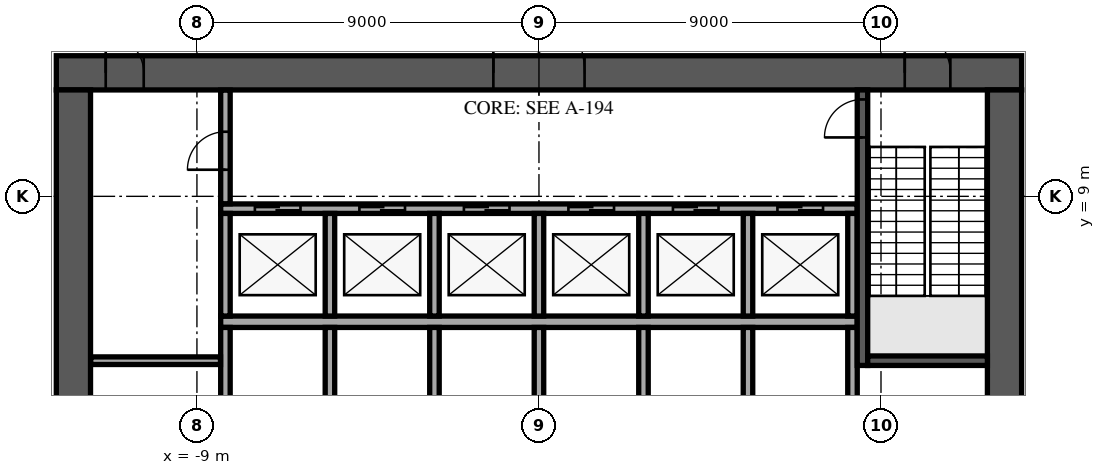
"""IFC4 building model, lengths in metres.
Left out: names, types, materials, properties, quantities, classifications, styles, units other than length and angle.
Written with IfcOpenShell. Run it as: python <this file> out.ifc"""

import sys

from ifc_helpers import new_model, si_unit, direction, frame, frame_2d, origin, place, context, subcontext, project, spatial, rectangle, extrude, element, fill, save


model = new_model("IFC4")
c1 = context("Model", 3, precision=1e-05, world=origin(), true_north=direction((0.0, 1.0)))
c2 = subcontext(c1, "Body", "Model", "MODEL_VIEW")
j1 = project(units=[si_unit("LENGTHUNIT", "METRE"), si_unit("PLANEANGLEUNIT", "RADIAN")], contexts=[c1])
p1 = place(None, origin())
s1 = spatial("IfcSite", under=j1, at=p1, CompositionType="ELEMENT")
p2 = place(p1, origin())
s2 = spatial("IfcBuilding", under=s1, at=p2, CompositionType="ELEMENT")
p3 = place(p2, frame((0.0, 0.0, 237.3)))
s3 = spatial("IfcBuildingStorey", under=s2, at=p3, CompositionType="ELEMENT", Elevation=237.3)
p4 = place(p3, frame((-12.7, 12.25, 0.0), z_axis=(0.0, 0.0, 1.0), x_axis=(1.0, 0.0, 0.0)))
e1 = element("IfcWall", 1, at=p4, inside=s3, PredefinedType="SHEAR", context=c2, shape_type="SweptSolid", body=[
    extrude(rectangle(XDim=25.4, YDim=0.9, at=frame_2d((12.7, 0.0))), origin(), (0.0, 0.0, 1.0), 5.24),
])
p5 = place(p4, frame((11.5, 0.0, 0.0)))
e2 = element("IfcOpeningElement", 2, at=p5, cuts=e1, PredefinedType="OPENING", context=c2, shape_type="SweptSolid", body=[
    extrude(rectangle(XDim=2.4, YDim=2.4, at=frame_2d((1.2, 1.2))), frame((0.0, 0.46, 0.0), z_axis=(0.0, -1.0, 0.0), x_axis=(1.0, 0.0, 0.0)), (0.0, 0.0, 1.0), 0.92),
])
p6 = place(p4, frame((22.325, 0.0, 0.0)))
e3 = element("IfcOpeningElement", 3, at=p6, cuts=e1, PredefinedType="OPENING", context=c2, shape_type="SweptSolid", body=[
    extrude(rectangle(XDim=1.2, YDim=2.1, at=frame_2d((0.6, 1.05))), frame((0.0, 0.46, 0.0), z_axis=(0.0, -1.0, 0.0), x_axis=(1.0, 0.0, 0.0)), (0.0, 0.0, 1.0), 0.92),
])
p7 = place(p4, frame((1.3, 0.0, 0.0)))
e4 = element("IfcOpeningElement", 4, at=p7, cuts=e1, PredefinedType="OPENING", context=c2, shape_type="SweptSolid", body=[
    extrude(rectangle(XDim=1.0, YDim=2.1, at=frame_2d((0.5, 1.05))), frame((0.0, 0.46, 0.0), z_axis=(0.0, -1.0, 0.0), x_axis=(1.0, 0.0, 0.0)), (0.0, 0.0, 1.0), 0.92),
])
p8 = place(p3, frame((12.25, -11.8, 0.0), z_axis=(0.0, 0.0, 1.0), x_axis=(0.0, 1.0, 0.0)))
e5 = element("IfcWall", 5, at=p8, inside=s3, PredefinedType="SHEAR", context=c2, shape_type="SweptSolid", body=[
    extrude(rectangle(XDim=23.6, YDim=0.9, at=frame_2d((11.8, 0.0))), origin(), (0.0, 0.0, 1.0), 5.24),
])
p9 = place(p8, frame((10.6, 0.0, 0.0)))
e6 = element("IfcOpeningElement", 6, at=p9, cuts=e5, PredefinedType="OPENING", context=c2, shape_type="SweptSolid", body=[
    extrude(rectangle(XDim=2.4, YDim=2.4, at=frame_2d((1.2, 1.2))), frame((0.0, 0.46, 0.0), z_axis=(0.0, -1.0, 0.0), x_axis=(1.0, 0.0, 0.0)), (0.0, 0.0, 1.0), 0.92),
])
p10 = place(p3, frame((-12.25, -11.8, 0.0), z_axis=(0.0, 0.0, 1.0), x_axis=(0.0, 1.0, 0.0)))
e7 = element("IfcWall", 7, at=p10, inside=s3, PredefinedType="SHEAR", context=c2, shape_type="SweptSolid", body=[
    extrude(rectangle(XDim=23.6, YDim=0.9, at=frame_2d((11.8, 0.0))), origin(), (0.0, 0.0, 1.0), 5.24),
])
p11 = place(p10, frame((10.6, 0.0, 0.0)))
e8 = element("IfcOpeningElement", 8, at=p11, cuts=e7, PredefinedType="OPENING", context=c2, shape_type="SweptSolid", body=[
    extrude(rectangle(XDim=2.4, YDim=2.4, at=frame_2d((1.2, 1.2))), frame((0.0, 0.46, 0.0), z_axis=(0.0, -1.0, 0.0), x_axis=(1.0, 0.0, 0.0)), (0.0, 0.0, 1.0), 0.92),
])
p12 = place(p3, frame((-8.375, 5.7, 0.0), z_axis=(0.0, 0.0, 1.0), x_axis=(1.0, 0.0, 0.0)))
e9 = element("IfcWall", 9, at=p12, inside=s3, PredefinedType="SOLIDWALL", context=c2, shape_type="SweptSolid", body=[
    extrude(rectangle(XDim=16.75, YDim=0.3, at=frame_2d((8.375, 0.0))), origin(), (0.0, 0.0, 1.0), 5.24),
])
for number, where, z_axis, x_axis in (
    (10, (-8.25, 2.85, 0.0), (0.0, 0.0, 1.0), (0.0, 1.0, 0.0)),
    (11, (-5.5, 2.85, 0.0), (0.0, 0.0, 1.0), (0.0, 1.0, 0.0)),
    (12, (-2.75, 2.85, 0.0), (0.0, 0.0, 1.0), (0.0, 1.0, 0.0)),
    (13, (0.0, 2.85, 0.0), (0.0, 0.0, 1.0), (0.0, 1.0, 0.0)),
    (14, (2.75, 2.85, 0.0), (0.0, 0.0, 1.0), (0.0, 1.0, 0.0)),
    (15, (5.5, 2.85, 0.0), (0.0, 0.0, 1.0), (0.0, 1.0, 0.0)),
    (16, (8.25, 2.85, 0.0), (0.0, 0.0, 1.0), (0.0, 1.0, 0.0)),
):
    element("IfcWall", number, at=place(p3, frame(where, z_axis=z_axis, x_axis=x_axis)), inside=s3, PredefinedType="SOLIDWALL", context=c2, shape_type="SweptSolid", body=[
        extrude(rectangle(XDim=2.7, YDim=0.25, at=frame_2d((1.35, 0.0))), origin(), (0.0, 0.0, 1.0), 5.24),
    ])
p13 = place(p3, frame((-8.375, 8.675, 0.0), z_axis=(0.0, 0.0, 1.0), x_axis=(1.0, 0.0, 0.0)))
e17 = element("IfcWall", 17, at=p13, inside=s3, PredefinedType="SOLIDWALL", context=c2, shape_type="SweptSolid", body=[
    extrude(rectangle(XDim=16.75, YDim=0.25, at=frame_2d((8.375, 0.0))), origin(), (0.0, 0.0, 1.0), 5.24),
])
p14 = place(p13, frame((0.9, 0.0, 0.0)))
e18 = element("IfcOpeningElement", 18, at=p14, cuts=e17, PredefinedType="OPENING", context=c2, shape_type="SweptSolid", body=[
    extrude(rectangle(XDim=1.2, YDim=2.1, at=frame_2d((0.6, 1.05))), frame((0.0, 0.135, 0.0), z_axis=(0.0, -1.0, 0.0), x_axis=(1.0, 0.0, 0.0)), (0.0, 0.0, 1.0), 0.27),
])
p15 = place(p13, frame((3.65, 0.0, 0.0)))
e19 = element("IfcOpeningElement", 19, at=p15, cuts=e17, PredefinedType="OPENING", context=c2, shape_type="SweptSolid", body=[
    extrude(rectangle(XDim=1.2, YDim=2.1, at=frame_2d((0.6, 1.05))), frame((0.0, 0.135, 0.0), z_axis=(0.0, -1.0, 0.0), x_axis=(1.0, 0.0, 0.0)), (0.0, 0.0, 1.0), 0.27),
])
p16 = place(p13, frame((6.4, 0.0, 0.0)))
e20 = element("IfcOpeningElement", 20, at=p16, cuts=e17, PredefinedType="OPENING", context=c2, shape_type="SweptSolid", body=[
    extrude(rectangle(XDim=1.2, YDim=2.1, at=frame_2d((0.6, 1.05))), frame((0.0, 0.135, 0.0), z_axis=(0.0, -1.0, 0.0), x_axis=(1.0, 0.0, 0.0)), (0.0, 0.0, 1.0), 0.27),
])
p17 = place(p13, frame((9.15, 0.0, 0.0)))
e21 = element("IfcOpeningElement", 21, at=p17, cuts=e17, PredefinedType="OPENING", context=c2, shape_type="SweptSolid", body=[
    extrude(rectangle(XDim=1.2, YDim=2.1, at=frame_2d((0.6, 1.05))), frame((0.0, 0.135, 0.0), z_axis=(0.0, -1.0, 0.0), x_axis=(1.0, 0.0, 0.0)), (0.0, 0.0, 1.0), 0.27),
])
p18 = place(p13, frame((11.9, 0.0, 0.0)))
e22 = element("IfcOpeningElement", 22, at=p18, cuts=e17, PredefinedType="OPENING", context=c2, shape_type="SweptSolid", body=[
    extrude(rectangle(XDim=1.2, YDim=2.1, at=frame_2d((0.6, 1.05))), frame((0.0, 0.135, 0.0), z_axis=(0.0, -1.0, 0.0), x_axis=(1.0, 0.0, 0.0)), (0.0, 0.0, 1.0), 0.27),
])
p19 = place(p13, frame((14.65, 0.0, 0.0)))
e23 = element("IfcOpeningElement", 23, at=p19, cuts=e17, PredefinedType="OPENING", context=c2, shape_type="SweptSolid", body=[
    extrude(rectangle(XDim=1.2, YDim=2.1, at=frame_2d((0.6, 1.05))), frame((0.0, 0.135, 0.0), z_axis=(0.0, -1.0, 0.0), x_axis=(1.0, 0.0, 0.0)), (0.0, 0.0, 1.0), 0.27),
])
for number, where, z_axis, x_axis in (
    (24, (-8.25, 5.85, 0.0), (0.0, 0.0, 1.0), (0.0, 1.0, 0.0)),
    (25, (-5.5, 5.85, 0.0), (0.0, 0.0, 1.0), (0.0, 1.0, 0.0)),
    (26, (-2.75, 5.85, 0.0), (0.0, 0.0, 1.0), (0.0, 1.0, 0.0)),
    (27, (0.0, 5.85, 0.0), (0.0, 0.0, 1.0), (0.0, 1.0, 0.0)),
    (28, (2.75, 5.85, 0.0), (0.0, 0.0, 1.0), (0.0, 1.0, 0.0)),
    (29, (5.5, 5.85, 0.0), (0.0, 0.0, 1.0), (0.0, 1.0, 0.0)),
    (30, (8.25, 5.85, 0.0), (0.0, 0.0, 1.0), (0.0, 1.0, 0.0)),
):
    element("IfcWall", number, at=place(p3, frame(where, z_axis=z_axis, x_axis=x_axis)), inside=s3, PredefinedType="SOLIDWALL", context=c2, shape_type="SweptSolid", body=[
        extrude(rectangle(XDim=2.7, YDim=0.25, at=frame_2d((1.35, 0.0))), origin(), (0.0, 0.0, 1.0), 5.24),
    ])
p20 = place(p3, frame((8.512, 4.55, 0.0), z_axis=(0.0, 0.0, 1.0), x_axis=(0.0, 1.0, 0.0)))
e31 = element("IfcWall", 31, at=p20, inside=s3, PredefinedType="SOLIDWALL", context=c2, shape_type="SweptSolid", body=[
    extrude(rectangle(XDim=7.25, YDim=0.275, at=frame_2d((3.625, 0.0))), origin(), (0.0, 0.0, 1.0), 5.24),
])
p21 = place(p20, frame((6.0, 0.0, 0.0)))
e32 = element("IfcOpeningElement", 32, at=p21, cuts=e31, PredefinedType="OPENING", context=c2, shape_type="SweptSolid", body=[
    extrude(rectangle(XDim=1.0, YDim=2.1, at=frame_2d((0.5, 1.05))), frame((0.0, 0.147, 0.0), z_axis=(0.0, -1.0, 0.0), x_axis=(1.0, 0.0, 0.0)), (0.0, 0.0, 1.0), 0.295),
])
p22 = place(p3, frame((8.65, 4.675, 0.0), z_axis=(0.0, 0.0, 1.0), x_axis=(1.0, 0.0, 0.0)))
e33 = element("IfcWall", 33, at=p22, inside=s3, PredefinedType="SOLIDWALL", context=c2, shape_type="SweptSolid", body=[
    extrude(rectangle(XDim=3.15, YDim=0.25, at=frame_2d((1.575, 0.0))), origin(), (0.0, 0.0, 1.0), 5.24),
])
p23 = place(p3, frame((-11.795, 4.675, 0.0), z_axis=(0.0, 0.0, 1.0), x_axis=(1.0, 0.0, 0.0)))
e34 = element("IfcWall", 34, at=p23, inside=s3, PredefinedType="PARTITIONING", context=c2, shape_type="SweptSolid", body=[
    extrude(rectangle(XDim=3.415, YDim=0.2, at=frame_2d((1.708, 0.0))), origin(), (0.0, 0.0, 1.0), 5.24),
])
p24 = place(p3, frame((-8.25, 8.805, 0.0), z_axis=(0.0, 0.0, 1.0), x_axis=(0.0, 1.0, 0.0)))
e35 = element("IfcWall", 35, at=p24, inside=s3, PredefinedType="PARTITIONING", context=c2, shape_type="SweptSolid", body=[
    extrude(rectangle(XDim=2.99, YDim=0.25, at=frame_2d((1.495, 0.0))), origin(), (0.0, 0.0, 1.0), 5.24),
])
p25 = place(p24, frame((0.895, 0.0, 0.0)))
e36 = element("IfcOpeningElement", 36, at=p25, cuts=e35, PredefinedType="OPENING", context=c2, shape_type="SweptSolid", body=[
    extrude(rectangle(XDim=1.0, YDim=2.1, at=frame_2d((0.5, 1.05))), frame((0.0, 0.135, 0.0), z_axis=(0.0, -1.0, 0.0), x_axis=(1.0, 0.0, 0.0)), (0.0, 0.0, 1.0), 0.27),
])
p26 = place(p3, frame((33.651, 11.398, 0.0), z_axis=(0.0, 0.0, 1.0), x_axis=(-0.788011466291, 0.61566056313, 0.0)))
e37 = element("IfcWall", 37, at=p26, inside=s3, PredefinedType="STANDARD", context=c2, shape_type="SweptSolid", body=[
    extrude(rectangle(XDim=39.0, YDim=0.6, at=frame_2d((19.5, 0.0))), origin(), (0.0, 0.0, 1.0), 5.24),
])
p27 = place(p26, frame((1.217, 0.0, 0.6)))
e38 = element("IfcOpeningElement", 38, at=p27, cuts=e37, PredefinedType="OPENING", context=c2, shape_type="SweptSolid", body=[
    extrude(rectangle(XDim=1.9, YDim=4.19, at=frame_2d((0.95, 2.095))), frame((0.0, 0.31, 0.0), z_axis=(0.0, -1.0, 0.0), x_axis=(1.0, 0.0, 0.0)), (0.0, 0.0, 1.0), 0.62),
])
p28 = place(p26, frame((5.55, 0.0, 0.6)))
e39 = element("IfcOpeningElement", 39, at=p28, cuts=e37, PredefinedType="OPENING", context=c2, shape_type="SweptSolid", body=[
    extrude(rectangle(XDim=1.9, YDim=4.19, at=frame_2d((0.95, 2.095))), frame((0.0, 0.31, 0.0), z_axis=(0.0, -1.0, 0.0), x_axis=(1.0, 0.0, 0.0)), (0.0, 0.0, 1.0), 0.62),
])
p29 = place(p26, frame((18.55, 0.0, 0.6)))
e40 = element("IfcOpeningElement", 40, at=p29, cuts=e37, PredefinedType="OPENING", context=c2, shape_type="SweptSolid", body=[
    extrude(rectangle(XDim=1.9, YDim=4.19, at=frame_2d((0.95, 2.095))), frame((0.0, 0.31, 0.0), z_axis=(0.0, -1.0, 0.0), x_axis=(1.0, 0.0, 0.0)), (0.0, 0.0, 1.0), 0.62),
])
p30 = place(p26, frame((22.883, 0.0, 0.6)))
e41 = element("IfcOpeningElement", 41, at=p30, cuts=e37, PredefinedType="OPENING", context=c2, shape_type="SweptSolid", body=[
    extrude(rectangle(XDim=1.9, YDim=4.19, at=frame_2d((0.95, 2.095))), frame((0.0, 0.31, 0.0), z_axis=(0.0, -1.0, 0.0), x_axis=(1.0, 0.0, 0.0)), (0.0, 0.0, 1.0), 0.62),
])
p31 = place(p26, frame((31.55, 0.0, 0.6)))
e42 = element("IfcOpeningElement", 42, at=p31, cuts=e37, PredefinedType="OPENING", context=c2, shape_type="SweptSolid", body=[
    extrude(rectangle(XDim=1.9, YDim=4.19, at=frame_2d((0.95, 2.095))), frame((0.0, 0.31, 0.0), z_axis=(0.0, -1.0, 0.0), x_axis=(1.0, 0.0, 0.0)), (0.0, 0.0, 1.0), 0.62),
])
p32 = place(p26, frame((35.883, 0.0, 0.6)))
e43 = element("IfcOpeningElement", 43, at=p32, cuts=e37, PredefinedType="OPENING", context=c2, shape_type="SweptSolid", body=[
    extrude(rectangle(XDim=1.9, YDim=4.19, at=frame_2d((0.95, 2.095))), frame((0.0, 0.31, 0.0), z_axis=(0.0, -1.0, 0.0), x_axis=(1.0, 0.0, 0.0)), (0.0, 0.0, 1.0), 0.62),
])
p33 = place(p5, origin())
e44 = element("IfcDoor", 44, at=p33, inside=s3, OperationType="SINGLE_SWING_LEFT", PredefinedType="DOOR", context=c2, shape_type="SweptSolid", body=[
    extrude(rectangle(XDim=2.4, YDim=2.4, at=frame_2d((1.2, 1.2))), frame((0.0, 0.025, 0.0), z_axis=(0.0, -1.0, 0.0), x_axis=(1.0, 0.0, 0.0)), (0.0, 0.0, 1.0), 0.05),
])
fill(e2, e44)
p34 = place(p6, origin())
e45 = element("IfcDoor", 45, at=p34, inside=s3, OperationType="SINGLE_SWING_LEFT", PredefinedType="DOOR", context=c2, shape_type="SweptSolid", body=[
    extrude(rectangle(XDim=1.2, YDim=2.1, at=frame_2d((0.6, 1.05))), frame((0.0, 0.025, 0.0), z_axis=(0.0, -1.0, 0.0), x_axis=(1.0, 0.0, 0.0)), (0.0, 0.0, 1.0), 0.05),
])
fill(e3, e45)
p35 = place(p7, origin())
e46 = element("IfcDoor", 46, at=p35, inside=s3, OperationType="SINGLE_SWING_LEFT", PredefinedType="DOOR", context=c2, shape_type="SweptSolid", body=[
    extrude(rectangle(XDim=1.0, YDim=2.1, at=frame_2d((0.5, 1.05))), frame((0.0, 0.025, 0.0), z_axis=(0.0, -1.0, 0.0), x_axis=(1.0, 0.0, 0.0)), (0.0, 0.0, 1.0), 0.05),
])
fill(e4, e46)
p36 = place(p14, origin())
e47 = element("IfcDoor", 47, at=p36, inside=s3, OperationType="DOUBLE_DOOR_SLIDING", PredefinedType="DOOR", context=c2, shape_type="SweptSolid", body=[
    extrude(rectangle(XDim=1.2, YDim=2.1, at=frame_2d((0.6, 1.05))), frame((0.0, 0.025, 0.0), z_axis=(0.0, -1.0, 0.0), x_axis=(1.0, 0.0, 0.0)), (0.0, 0.0, 1.0), 0.05),
])
fill(e18, e47)
p37 = place(p15, origin())
e48 = element("IfcDoor", 48, at=p37, inside=s3, OperationType="DOUBLE_DOOR_SLIDING", PredefinedType="DOOR", context=c2, shape_type="SweptSolid", body=[
    extrude(rectangle(XDim=1.2, YDim=2.1, at=frame_2d((0.6, 1.05))), frame((0.0, 0.025, 0.0), z_axis=(0.0, -1.0, 0.0), x_axis=(1.0, 0.0, 0.0)), (0.0, 0.0, 1.0), 0.05),
])
fill(e19, e48)
p38 = place(p16, origin())
e49 = element("IfcDoor", 49, at=p38, inside=s3, OperationType="DOUBLE_DOOR_SLIDING", PredefinedType="DOOR", context=c2, shape_type="SweptSolid", body=[
    extrude(rectangle(XDim=1.2, YDim=2.1, at=frame_2d((0.6, 1.05))), frame((0.0, 0.025, 0.0), z_axis=(0.0, -1.0, 0.0), x_axis=(1.0, 0.0, 0.0)), (0.0, 0.0, 1.0), 0.05),
])
fill(e20, e49)
p39 = place(p17, origin())
e50 = element("IfcDoor", 50, at=p39, inside=s3, OperationType="DOUBLE_DOOR_SLIDING", PredefinedType="DOOR", context=c2, shape_type="SweptSolid", body=[
    extrude(rectangle(XDim=1.2, YDim=2.1, at=frame_2d((0.6, 1.05))), frame((0.0, 0.025, 0.0), z_axis=(0.0, -1.0, 0.0), x_axis=(1.0, 0.0, 0.0)), (0.0, 0.0, 1.0), 0.05),
])
fill(e21, e50)
p40 = place(p18, origin())
e51 = element("IfcDoor", 51, at=p40, inside=s3, OperationType="DOUBLE_DOOR_SLIDING", PredefinedType="DOOR", context=c2, shape_type="SweptSolid", body=[
    extrude(rectangle(XDim=1.2, YDim=2.1, at=frame_2d((0.6, 1.05))), frame((0.0, 0.025, 0.0), z_axis=(0.0, -1.0, 0.0), x_axis=(1.0, 0.0, 0.0)), (0.0, 0.0, 1.0), 0.05),
])
fill(e22, e51)
p41 = place(p19, origin())
e52 = element("IfcDoor", 52, at=p41, inside=s3, OperationType="DOUBLE_DOOR_SLIDING", PredefinedType="DOOR", context=c2, shape_type="SweptSolid", body=[
    extrude(rectangle(XDim=1.2, YDim=2.1, at=frame_2d((0.6, 1.05))), frame((0.0, 0.025, 0.0), z_axis=(0.0, -1.0, 0.0), x_axis=(1.0, 0.0, 0.0)), (0.0, 0.0, 1.0), 0.05),
])
fill(e23, e52)
p42 = place(p21, origin())
e53 = element("IfcDoor", 53, at=p42, inside=s3, OperationType="SINGLE_SWING_LEFT", PredefinedType="DOOR", context=c2, shape_type="SweptSolid", body=[
    extrude(rectangle(XDim=1.0, YDim=2.1, at=frame_2d((0.5, 1.05))), frame((0.0, 0.025, 0.0), z_axis=(0.0, -1.0, 0.0), x_axis=(1.0, 0.0, 0.0)), (0.0, 0.0, 1.0), 0.05),
])
fill(e32, e53)
p43 = place(p25, origin())
e54 = element("IfcDoor", 54, at=p43, inside=s3, OperationType="SINGLE_SWING_LEFT", PredefinedType="DOOR", context=c2, shape_type="SweptSolid", body=[
    extrude(rectangle(XDim=1.0, YDim=2.1, at=frame_2d((0.5, 1.05))), frame((0.0, 0.025, 0.0), z_axis=(0.0, -1.0, 0.0), x_axis=(1.0, 0.0, 0.0)), (0.0, 0.0, 1.0), 0.05),
])
fill(e36, e54)
save(model, sys.argv[1])
